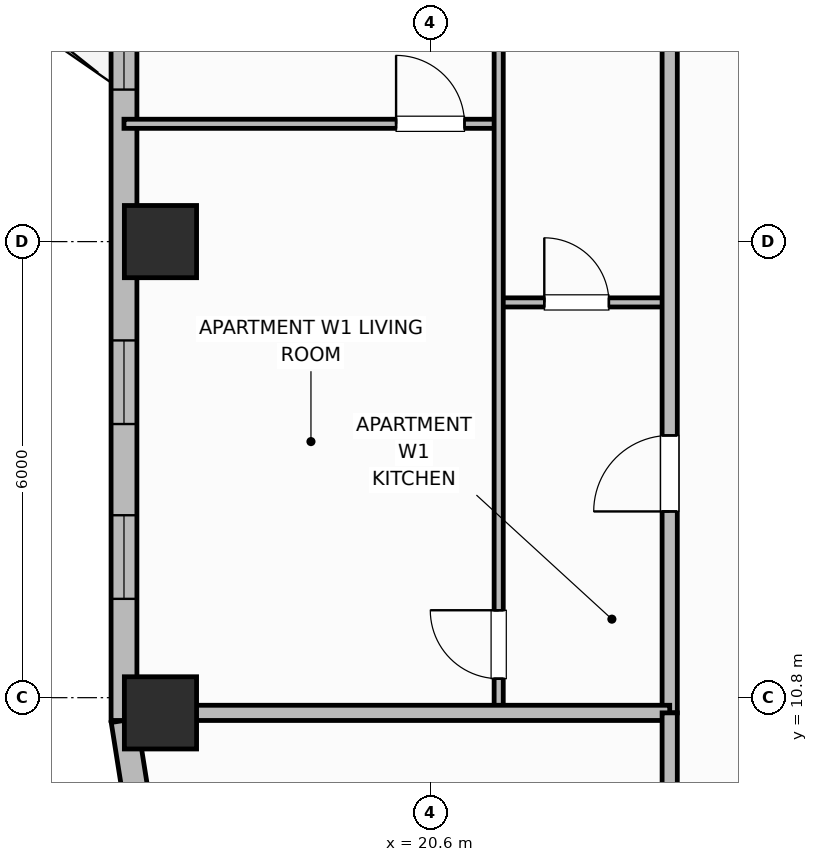
"""IFC4 building model, lengths in metres.
Left out: names, types, materials, properties, quantities, classifications, styles, units other than length and angle.
Written with IfcOpenShell. Run it as: python <this file> out.ifc"""

import sys

from ifc_helpers import new_model, si_unit, direction, frame, frame_2d, origin, origin_2d, place, context, subcontext, project, spatial, rectangle, extrude, element, fill, save


model = new_model("IFC4")
c1 = context("Model", 3, precision=1e-05, world=origin(), true_north=direction((0.0, 1.0)))
c2 = subcontext(c1, "Body", "Model", "MODEL_VIEW")
j1 = project(units=[si_unit("LENGTHUNIT", "METRE"), si_unit("PLANEANGLEUNIT", "RADIAN")], contexts=[c1])
p1 = place(None, origin())
s1 = spatial("IfcSite", under=j1, at=p1, CompositionType="ELEMENT")
p2 = place(p1, origin())
s2 = spatial("IfcBuilding", under=s1, at=p2, CompositionType="ELEMENT")
p3 = place(p2, frame((0.0, 0.0, 192.2)))
s3 = spatial("IfcBuildingStorey", under=s2, at=p3, CompositionType="ELEMENT", Elevation=192.2)
for number, where, z_axis, x_axis in (
    (1, (17.05, 10.6, 0.0), (0.0, 0.0, 1.0), (1.0, 0.0, 0.0)),
    (2, (17.05, 16.8, 0.0), (0.0, 0.0, 1.0), (1.0, 0.0, 0.0)),
):
    element("IfcColumn", number, at=place(p3, frame(where, z_axis=z_axis, x_axis=x_axis)), inside=s3, PredefinedType="COLUMN", context=c2, shape_type="SweptSolid", body=[
        extrude(rectangle(XDim=0.95, YDim=0.95, at=origin_2d()), origin(), (0.0, 0.0, 1.0), 3.7),
    ])
p4 = place(p3, frame((16.57, 10.5, 0.0), z_axis=(0.0, 0.0, 1.0), x_axis=(0.156514556949, -0.987675651954, 0.0)))
e3 = element("IfcWall", 3, at=p4, inside=s3, PredefinedType="SOLIDWALL", context=c2, shape_type="SweptSolid", body=[
    extrude(rectangle(XDim=1.135, YDim=0.34, at=frame_2d((0.568, 0.0))), origin(), (0.0, 0.0, 1.0), 2.66),
])
p5 = place(p3, frame((16.57, 23.8, 0.0), z_axis=(0.0, 0.0, 1.0), x_axis=(0.0, -1.0, 0.0)))
e4 = element("IfcWall", 4, at=p5, inside=s3, PredefinedType="SOLIDWALL", context=c2, shape_type="SweptSolid", body=[
    extrude(rectangle(XDim=13.3, YDim=0.34, at=frame_2d((6.65, 0.0))), origin(), (0.0, 0.0, 1.0), 2.66),
])
p6 = place(p5, frame((1.7, 0.0, 0.0)))
e5 = element("IfcOpeningElement", 5, at=p6, cuts=e4, PredefinedType="OPENING", context=c2, shape_type="SweptSolid", body=[
    extrude(rectangle(XDim=1.6, YDim=2.1, at=frame_2d((0.8, 1.05))), frame((0.0, 0.18, 0.0), z_axis=(0.0, -1.0, 0.0), x_axis=(1.0, 0.0, 0.0)), (0.0, 0.0, 1.0), 0.36),
])
p7 = place(p5, frame((3.9, 0.0, 0.89)))
e6 = element("IfcOpeningElement", 6, at=p7, cuts=e4, PredefinedType="OPENING", context=c2, shape_type="SweptSolid", body=[
    extrude(rectangle(XDim=1.1, YDim=1.65, at=frame_2d((0.55, 0.825))), frame((0.0, 0.18, 0.0), z_axis=(0.0, -1.0, 0.0), x_axis=(1.0, 0.0, 0.0)), (0.0, 0.0, 1.0), 0.36),
])
p8 = place(p5, frame((8.3, 0.0, 0.89)))
e7 = element("IfcOpeningElement", 7, at=p8, cuts=e4, PredefinedType="OPENING", context=c2, shape_type="SweptSolid", body=[
    extrude(rectangle(XDim=1.1, YDim=1.65, at=frame_2d((0.55, 0.825))), frame((0.0, 0.18, 0.0), z_axis=(0.0, -1.0, 0.0), x_axis=(1.0, 0.0, 0.0)), (0.0, 0.0, 1.0), 0.36),
])
p9 = place(p5, frame((10.6, 0.0, 0.89)))
e8 = element("IfcOpeningElement", 8, at=p9, cuts=e4, PredefinedType="OPENING", context=c2, shape_type="SweptSolid", body=[
    extrude(rectangle(XDim=1.1, YDim=1.65, at=frame_2d((0.55, 0.825))), frame((0.0, 0.18, 0.0), z_axis=(0.0, -1.0, 0.0), x_axis=(1.0, 0.0, 0.0)), (0.0, 0.0, 1.0), 0.36),
])
p10 = place(p3, frame((21.5, 16.0, 0.0), z_axis=(0.0, 0.0, 1.0), x_axis=(1.0, 0.0, 0.0)))
e9 = element("IfcWall", 9, at=p10, inside=s3, PredefinedType="PARTITIONING", context=c2, shape_type="SweptSolid", body=[
    extrude(rectangle(XDim=2.25, YDim=0.12, at=frame_2d((1.125, 0.0))), origin(), (0.0, 0.0, 1.0), 2.49),
])
p11 = place(p10, frame((0.6, 0.0, 0.0)))
e10 = element("IfcOpeningElement", 10, at=p11, cuts=e9, PredefinedType="OPENING", context=c2, shape_type="SweptSolid", body=[
    extrude(rectangle(XDim=0.85, YDim=2.1, at=frame_2d((0.425, 1.05))), frame((0.0, 0.07, 0.0), z_axis=(0.0, -1.0, 0.0), x_axis=(1.0, 0.0, 0.0)), (0.0, 0.0, 1.0), 0.14),
])
p12 = place(p3, frame((16.57, 18.35, 0.0), z_axis=(0.0, 0.0, 1.0), x_axis=(1.0, 0.0, 0.0)))
e11 = element("IfcWall", 11, at=p12, inside=s3, PredefinedType="PARTITIONING", context=c2, shape_type="SweptSolid", body=[
    extrude(rectangle(XDim=4.93, YDim=0.12, at=frame_2d((2.465, 0.0))), origin(), (0.0, 0.0, 1.0), 2.49),
])
p13 = place(p12, frame((3.58, 0.0, 0.0)))
e12 = element("IfcOpeningElement", 12, at=p13, cuts=e11, PredefinedType="OPENING", context=c2, shape_type="SweptSolid", body=[
    extrude(rectangle(XDim=0.9, YDim=2.1, at=frame_2d((0.45, 1.05))), frame((0.0, 0.07, 0.0), z_axis=(0.0, -1.0, 0.0), x_axis=(1.0, 0.0, 0.0)), (0.0, 0.0, 1.0), 0.14),
])
p14 = place(p3, frame((21.5, 10.64, 0.0), z_axis=(0.0, 0.0, 1.0), x_axis=(0.0, 1.0, 0.0)))
e13 = element("IfcWall", 13, at=p14, inside=s3, PredefinedType="PARTITIONING", context=c2, shape_type="SweptSolid", body=[
    extrude(rectangle(XDim=12.592, YDim=0.12, at=frame_2d((6.296, 0.0))), origin(), (0.0, 0.0, 1.0), 2.49),
])
p15 = place(p14, frame((0.41, 0.0, 0.0)))
e14 = element("IfcOpeningElement", 14, at=p15, cuts=e13, PredefinedType="OPENING", context=c2, shape_type="SweptSolid", body=[
    extrude(rectangle(XDim=0.9, YDim=2.1, at=frame_2d((0.45, 1.05))), frame((0.0, 0.07, 0.0), z_axis=(0.0, -1.0, 0.0), x_axis=(1.0, 0.0, 0.0)), (0.0, 0.0, 1.0), 0.14),
])
p16 = place(p14, frame((10.471, 0.0, 0.0)))
e15 = element("IfcOpeningElement", 15, at=p16, cuts=e13, PredefinedType="OPENING", context=c2, shape_type="SweptSolid", body=[
    extrude(rectangle(XDim=0.82, YDim=2.08, at=frame_2d((0.41, 1.04))), frame((0.0, 0.07, 0.0), z_axis=(0.0, -1.0, 0.0), x_axis=(1.0, 0.0, 0.0)), (0.0, 0.0, 1.0), 0.14),
])
p17 = place(p3, frame((23.75, 10.6, 0.0), z_axis=(0.0, 0.0, 1.0), x_axis=(0.0, 1.0, 0.0)))
e16 = element("IfcWall", 16, at=p17, inside=s3, PredefinedType="PARTITIONING", context=c2, shape_type="SweptSolid", body=[
    extrude(rectangle(XDim=35.2, YDim=0.2, at=frame_2d((17.6, 0.0))), origin(), (0.0, 0.0, 1.0), 2.49),
])
p18 = place(p17, frame((2.65, 0.0, 0.0)))
e17 = element("IfcOpeningElement", 17, at=p18, cuts=e16, PredefinedType="OPENING", context=c2, shape_type="SweptSolid", body=[
    extrude(rectangle(XDim=1.0, YDim=2.15, at=frame_2d((0.5, 1.075))), frame((0.0, 0.11, 0.0), z_axis=(0.0, -1.0, 0.0), x_axis=(1.0, 0.0, 0.0)), (0.0, 0.0, 1.0), 0.22),
])
p19 = place(p17, frame((13.222, 0.0, 0.0)))
e18 = element("IfcOpeningElement", 18, at=p19, cuts=e16, PredefinedType="OPENING", context=c2, shape_type="SweptSolid", body=[
    extrude(rectangle(XDim=1.0, YDim=2.15, at=frame_2d((0.5, 1.075))), frame((0.0, 0.11, 0.0), z_axis=(0.0, -1.0, 0.0), x_axis=(1.0, 0.0, 0.0)), (0.0, 0.0, 1.0), 0.22),
])
p20 = place(p17, frame((24.838, 0.0, 0.0)))
e19 = element("IfcOpeningElement", 19, at=p20, cuts=e16, PredefinedType="OPENING", context=c2, shape_type="SweptSolid", body=[
    extrude(rectangle(XDim=1.0, YDim=2.15, at=frame_2d((0.5, 1.075))), frame((0.0, 0.11, 0.0), z_axis=(0.0, -1.0, 0.0), x_axis=(1.0, 0.0, 0.0)), (0.0, 0.0, 1.0), 0.22),
])
p21 = place(p3, frame((16.99, 10.6, 0.0), z_axis=(0.0, 0.0, 1.0), x_axis=(1.0, 0.0, 0.0)))
e20 = element("IfcWall", 20, at=p21, inside=s3, PredefinedType="PARTITIONING", context=c2, shape_type="SweptSolid", body=[
    extrude(rectangle(XDim=6.76, YDim=0.2, at=frame_2d((3.38, 0.0))), origin(), (0.0, 0.0, 1.0), 2.49),
])
p22 = place(p3, frame((23.75, 6.87, 0.0), z_axis=(0.0, 0.0, 1.0), x_axis=(0.0, 1.0, 0.0)))
e21 = element("IfcWall", 21, at=p22, inside=s3, PredefinedType="PARTITIONING", context=c2, shape_type="SweptSolid", body=[
    extrude(rectangle(XDim=3.73, YDim=0.2, at=frame_2d((1.865, 0.0))), origin(), (0.0, 0.0, 1.0), 2.49),
])
p23 = place(p7, origin())
e22 = element("IfcWindow", 22, at=p23, inside=s3, PartitioningType="SINGLE_PANEL", PredefinedType="WINDOW", context=c2, shape_type="SweptSolid", body=[
    extrude(rectangle(XDim=1.1, YDim=1.65, at=frame_2d((0.55, 0.825))), frame((0.0, 0.03, 0.0), z_axis=(0.0, -1.0, 0.0), x_axis=(1.0, 0.0, 0.0)), (0.0, 0.0, 1.0), 0.06),
])
fill(e6, e22)
p24 = place(p8, origin())
e23 = element("IfcWindow", 23, at=p24, inside=s3, PartitioningType="SINGLE_PANEL", PredefinedType="WINDOW", context=c2, shape_type="SweptSolid", body=[
    extrude(rectangle(XDim=1.1, YDim=1.65, at=frame_2d((0.55, 0.825))), frame((0.0, 0.03, 0.0), z_axis=(0.0, -1.0, 0.0), x_axis=(1.0, 0.0, 0.0)), (0.0, 0.0, 1.0), 0.06),
])
fill(e7, e23)
p25 = place(p9, origin())
e24 = element("IfcWindow", 24, at=p25, inside=s3, PartitioningType="SINGLE_PANEL", PredefinedType="WINDOW", context=c2, shape_type="SweptSolid", body=[
    extrude(rectangle(XDim=1.1, YDim=1.65, at=frame_2d((0.55, 0.825))), frame((0.0, 0.03, 0.0), z_axis=(0.0, -1.0, 0.0), x_axis=(1.0, 0.0, 0.0)), (0.0, 0.0, 1.0), 0.06),
])
fill(e8, e24)
p26 = place(p11, origin())
e25 = element("IfcDoor", 25, at=p26, inside=s3, OperationType="SINGLE_SWING_LEFT", PredefinedType="DOOR", context=c2, shape_type="SweptSolid", body=[
    extrude(rectangle(XDim=0.85, YDim=2.1, at=frame_2d((0.425, 1.05))), frame((0.0, 0.025, 0.0), z_axis=(0.0, -1.0, 0.0), x_axis=(1.0, 0.0, 0.0)), (0.0, 0.0, 1.0), 0.05),
])
fill(e10, e25)
p27 = place(p13, origin())
e26 = element("IfcDoor", 26, at=p27, inside=s3, OperationType="SINGLE_SWING_LEFT", PredefinedType="DOOR", context=c2, shape_type="SweptSolid", body=[
    extrude(rectangle(XDim=0.9, YDim=2.1, at=frame_2d((0.45, 1.05))), frame((0.0, 0.025, 0.0), z_axis=(0.0, -1.0, 0.0), x_axis=(1.0, 0.0, 0.0)), (0.0, 0.0, 1.0), 0.05),
])
fill(e12, e26)
p28 = place(p15, origin())
e27 = element("IfcDoor", 27, at=p28, inside=s3, OperationType="SINGLE_SWING_RIGHT", PredefinedType="DOOR", context=c2, shape_type="SweptSolid", body=[
    extrude(rectangle(XDim=0.9, YDim=2.1, at=frame_2d((0.45, 1.05))), frame((0.0, 0.025, 0.0), z_axis=(0.0, -1.0, 0.0), x_axis=(1.0, 0.0, 0.0)), (0.0, 0.0, 1.0), 0.05),
])
fill(e14, e27)
p29 = place(p18, origin())
e28 = element("IfcDoor", 28, at=p29, inside=s3, OperationType="SINGLE_SWING_LEFT", PredefinedType="DOOR", context=c2, shape_type="SweptSolid", body=[
    extrude(rectangle(XDim=1.0, YDim=2.15, at=frame_2d((0.5, 1.075))), frame((0.0, 0.025, 0.0), z_axis=(0.0, -1.0, 0.0), x_axis=(1.0, 0.0, 0.0)), (0.0, 0.0, 1.0), 0.05),
])
fill(e17, e28)
save(model, sys.argv[1])
